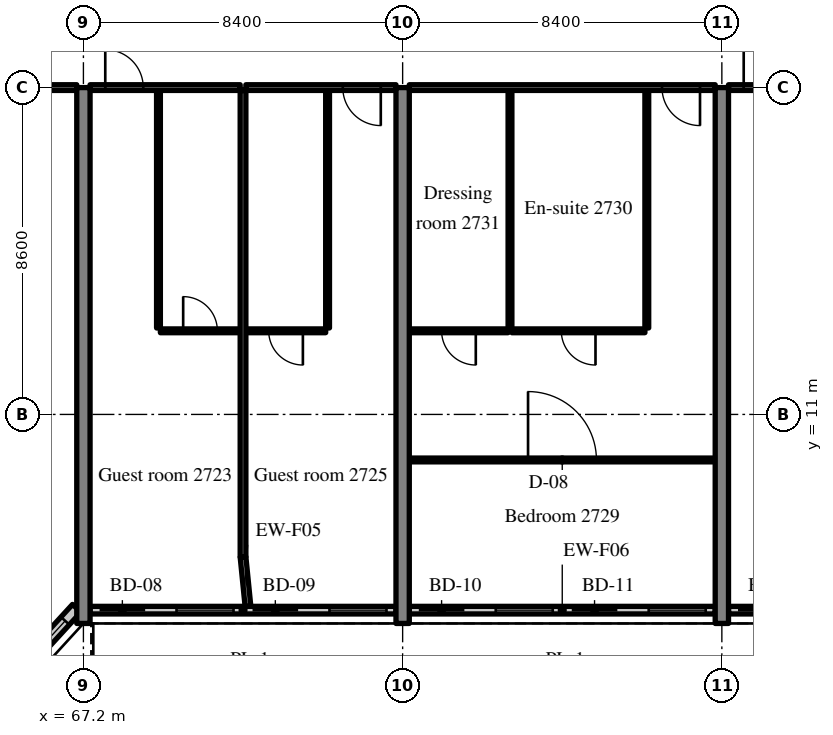
"""IFC4 building model, lengths in metres.
Left out: names, types, materials, properties, quantities, classifications, styles, units other than length and angle.
Written with IfcOpenShell. Run it as: python <this file> out.ifc"""

import sys

from ifc_helpers import new_model, si_unit, direction, frame, frame_2d, origin, place, context, subcontext, project, spatial, rectangle, extrude, source, transform, mapped, element, fill, save


model = new_model("IFC4")
c1 = context("Model", 3, precision=1e-05, world=origin(), true_north=direction((0.0, 1.0)))
c2 = subcontext(c1, "Body", "Model", "MODEL_VIEW")
j1 = project(units=[si_unit("LENGTHUNIT", "METRE"), si_unit("PLANEANGLEUNIT", "RADIAN")], contexts=[c1])
p1 = place(None, origin())
s1 = spatial("IfcSite", under=j1, at=p1, CompositionType="ELEMENT")
p2 = place(p1, origin())
s2 = spatial("IfcBuilding", under=s1, at=p2, CompositionType="ELEMENT")
p3 = place(p2, frame((0.0, 0.0, 114.2)))
s3 = spatial("IfcBuildingStorey", under=s2, at=p3, CompositionType="ELEMENT", Elevation=114.2)
m1 = source(origin(), c2, "Body", "SweptSolid", [
    extrude(rectangle(XDim=14.1, YDim=0.35, at=frame_2d((7.05, 0.0))), origin(), (0.0, 0.0, 1.0), 3.52),
])
for number, where, z_axis, x_axis in (
    (1, (67.2, 5.5, 0.0), (0.0, 0.0, 1.0), (0.0, 1.0, 0.0)),
    (2, (75.6, 5.5, 0.0), (0.0, 0.0, 1.0), (0.0, 1.0, 0.0)),
    (3, (84.0, 5.5, 0.0), (0.0, 0.0, 1.0), (0.0, 1.0, 0.0)),
):
    element("IfcWall", number, at=place(p3, frame(where, z_axis=z_axis, x_axis=x_axis)), inside=s3, PredefinedType="SHEAR", context=c2, shape_type="MappedRepresentation", body=[
        mapped(m1, transform((0.0, 0.0, 0.0), scale=1.0)),
    ])
m2 = source(origin(), c2, "Body", "SweptSolid", [
    extrude(rectangle(XDim=2.398, YDim=0.3, at=frame_2d((1.199, 0.0))), origin(), (0.0, 0.0, 1.0), 3.52),
])
p4 = place(p3, frame((65.404, 4.131, 0.0), z_axis=(0.0, 0.0, 1.0), x_axis=(0.675374189419, 0.737475222815, 0.0)))
e4 = element("IfcWall", 4, at=p4, inside=s3, PredefinedType="SOLIDWALL", context=c2, shape_type="MappedRepresentation", body=[
    mapped(m2, transform((0.0, 0.0, 0.0), scale=1.0)),
])
m3 = source(origin(), c2, "Body", "SweptSolid", [
    extrude(rectangle(XDim=1.5, YDim=2.0, at=frame_2d((0.75, 1.0))), frame((0.0, 0.16, 0.0), z_axis=(0.0, -1.0, 0.0), x_axis=(1.0, 0.0, 0.0)), (0.0, 0.0, 1.0), 0.32),
])
p5 = place(p4, frame((0.449, 0.0, 0.9)))
e5 = element("IfcOpeningElement", 5, at=p5, cuts=e4, PredefinedType="OPENING", context=c2, shape_type="MappedRepresentation", body=[
    mapped(m3, transform((0.0, 0.0, 0.0), scale=1.0)),
])
m4 = source(origin(), c2, "Body", "SweptSolid", [
    extrude(rectangle(XDim=8.05, YDim=0.2, at=frame_2d((4.025, 0.0))), origin(), (0.0, 0.0, 1.0), 2.82),
])
p6 = place(p3, frame((67.375, 5.85, 0.0), z_axis=(0.0, 0.0, 1.0), x_axis=(1.0, 0.0, 0.0)))
e6 = element("IfcWall", 6, at=p6, inside=s3, PredefinedType="SOLIDWALL", context=c2, shape_type="MappedRepresentation", body=[
    mapped(m4, transform((0.0, 0.0, 0.0), scale=1.0)),
])
m5 = source(origin(), c2, "Body", "SweptSolid", [
    extrude(rectangle(XDim=1.2, YDim=2.4, at=frame_2d((0.6, 1.2))), frame((0.0, 0.11, 0.0), z_axis=(0.0, -1.0, 0.0), x_axis=(1.0, 0.0, 0.0)), (0.0, 0.0, 1.0), 0.22),
])
p7 = place(p6, frame((0.25, 0.0, 0.0)))
e7 = element("IfcOpeningElement", 7, at=p7, cuts=e6, PredefinedType="OPENING", context=c2, shape_type="MappedRepresentation", body=[
    mapped(m5, transform((0.0, 0.0, 0.0), scale=1.0)),
])
m6 = source(origin(), c2, "Body", "SweptSolid", [
    extrude(rectangle(XDim=1.5, YDim=1.5, at=frame_2d((0.75, 0.75))), frame((0.0, 0.11, 0.0), z_axis=(0.0, -1.0, 0.0), x_axis=(1.0, 0.0, 0.0)), (0.0, 0.0, 1.0), 0.22),
])
p8 = place(p6, frame((2.275, 0.0, 0.9)))
e8 = element("IfcOpeningElement", 8, at=p8, cuts=e6, PredefinedType="OPENING", context=c2, shape_type="MappedRepresentation", body=[
    mapped(m6, transform((0.0, 0.0, 0.0), scale=1.0)),
])
p9 = place(p6, frame((4.275, 0.0, 0.0)))
e9 = element("IfcOpeningElement", 9, at=p9, cuts=e6, PredefinedType="OPENING", context=c2, shape_type="MappedRepresentation", body=[
    mapped(m5, transform((0.0, 0.0, 0.0), scale=1.0)),
])
p10 = place(p6, frame((6.3, 0.0, 0.9)))
e10 = element("IfcOpeningElement", 10, at=p10, cuts=e6, PredefinedType="OPENING", context=c2, shape_type="MappedRepresentation", body=[
    mapped(m6, transform((0.0, 0.0, 0.0), scale=1.0)),
])
p11 = place(p3, frame((75.775, 5.85, 0.0), z_axis=(0.0, 0.0, 1.0), x_axis=(1.0, 0.0, 0.0)))
e11 = element("IfcWall", 11, at=p11, inside=s3, PredefinedType="SOLIDWALL", context=c2, shape_type="MappedRepresentation", body=[
    mapped(m4, transform((0.0, 0.0, 0.0), scale=1.0)),
])
p12 = place(p11, frame((0.25, 0.0, 0.0)))
e12 = element("IfcOpeningElement", 12, at=p12, cuts=e11, PredefinedType="OPENING", context=c2, shape_type="MappedRepresentation", body=[
    mapped(m5, transform((0.0, 0.0, 0.0), scale=1.0)),
])
p13 = place(p11, frame((2.275, 0.0, 0.9)))
e13 = element("IfcOpeningElement", 13, at=p13, cuts=e11, PredefinedType="OPENING", context=c2, shape_type="MappedRepresentation", body=[
    mapped(m6, transform((0.0, 0.0, 0.0), scale=1.0)),
])
p14 = place(p11, frame((4.275, 0.0, 0.0)))
e14 = element("IfcOpeningElement", 14, at=p14, cuts=e11, PredefinedType="OPENING", context=c2, shape_type="MappedRepresentation", body=[
    mapped(m5, transform((0.0, 0.0, 0.0), scale=1.0)),
])
p15 = place(p11, frame((6.3, 0.0, 0.9)))
e15 = element("IfcOpeningElement", 15, at=p15, cuts=e11, PredefinedType="OPENING", context=c2, shape_type="MappedRepresentation", body=[
    mapped(m6, transform((0.0, 0.0, 0.0), scale=1.0)),
])
p16 = place(p3, frame((84.175, 5.85, 0.0), z_axis=(0.0, 0.0, 1.0), x_axis=(1.0, 0.0, 0.0)))
e16 = element("IfcWall", 16, at=p16, inside=s3, PredefinedType="SOLIDWALL", context=c2, shape_type="MappedRepresentation", body=[
    mapped(m4, transform((0.0, 0.0, 0.0), scale=1.0)),
])
p17 = place(p16, frame((0.25, 0.0, 0.0)))
e17 = element("IfcOpeningElement", 17, at=p17, cuts=e16, PredefinedType="OPENING", context=c2, shape_type="MappedRepresentation", body=[
    mapped(m5, transform((0.0, 0.0, 0.0), scale=1.0)),
])
p18 = place(p16, frame((2.275, 0.0, 0.9)))
e18 = element("IfcOpeningElement", 18, at=p18, cuts=e16, PredefinedType="OPENING", context=c2, shape_type="MappedRepresentation", body=[
    mapped(m6, transform((0.0, 0.0, 0.0), scale=1.0)),
])
p19 = place(p16, frame((4.275, 0.0, 0.0)))
e19 = element("IfcOpeningElement", 19, at=p19, cuts=e16, PredefinedType="OPENING", context=c2, shape_type="MappedRepresentation", body=[
    mapped(m5, transform((0.0, 0.0, 0.0), scale=1.0)),
])
p20 = place(p16, frame((6.3, 0.0, 0.9)))
e20 = element("IfcOpeningElement", 20, at=p20, cuts=e16, PredefinedType="OPENING", context=c2, shape_type="MappedRepresentation", body=[
    mapped(m6, transform((0.0, 0.0, 0.0), scale=1.0)),
])
m7 = source(origin(), c2, "Body", "SweptSolid", [
    extrude(rectangle(XDim=8.05, YDim=0.15, at=frame_2d((4.025, 0.0))), origin(), (0.0, 0.0, 1.0), 2.82),
])
p21 = place(p3, frame((58.975, 19.6, 0.0), z_axis=(0.0, 0.0, 1.0), x_axis=(1.0, 0.0, 0.0)))
e21 = element("IfcWall", 21, at=p21, inside=s3, PredefinedType="PARTITIONING", context=c2, shape_type="MappedRepresentation", body=[
    mapped(m7, transform((0.0, 0.0, 0.0), scale=1.0)),
])
m8 = source(origin(), c2, "Body", "SweptSolid", [
    extrude(rectangle(XDim=1.8, YDim=2.1, at=frame_2d((0.9, 1.05))), frame((0.0, 0.085, 0.0), z_axis=(0.0, -1.0, 0.0), x_axis=(1.0, 0.0, 0.0)), (0.0, 0.0, 1.0), 0.17),
])
p22 = place(p21, frame((3.125, 0.0, 0.0)))
e22 = element("IfcOpeningElement", 22, at=p22, cuts=e21, PredefinedType="OPENING", context=c2, shape_type="MappedRepresentation", body=[
    mapped(m8, transform((0.0, 0.0, 0.0), scale=1.0)),
])
m9 = source(origin(), c2, "Body", "SweptSolid", [
    extrude(rectangle(XDim=6.25, YDim=0.1, at=frame_2d((3.125, 0.0))), origin(), (0.0, 0.0, 1.0), 3.52),
])
p23 = place(p3, frame((69.175, 13.275, 0.0), z_axis=(0.0, 0.0, 1.0), x_axis=(0.0, 1.0, 0.0)))
e23 = element("IfcWall", 23, at=p23, inside=s3, PredefinedType="PARTITIONING", context=c2, shape_type="MappedRepresentation", body=[
    mapped(m9, transform((0.0, 0.0, 0.0), scale=1.0)),
])
m10 = source(origin(), c2, "Body", "SweptSolid", [
    extrude(rectangle(XDim=2.1, YDim=0.1, at=frame_2d((1.05, 0.0))), origin(), (0.0, 0.0, 1.0), 3.52),
])
p24 = place(p3, frame((69.225, 13.2, 0.0), z_axis=(0.0, 0.0, 1.0), x_axis=(1.0, 0.0, 0.0)))
e24 = element("IfcWall", 24, at=p24, inside=s3, PredefinedType="PARTITIONING", context=c2, shape_type="MappedRepresentation", body=[
    mapped(m10, transform((0.0, 0.0, 0.0), scale=1.0)),
])
m11 = source(origin(), c2, "Body", "SweptSolid", [
    extrude(rectangle(XDim=0.9, YDim=2.1, at=frame_2d((0.45, 1.05))), frame((0.0, 0.06, 0.0), z_axis=(0.0, -1.0, 0.0), x_axis=(1.0, 0.0, 0.0)), (0.0, 0.0, 1.0), 0.12),
])
p25 = place(p24, frame((0.6, 0.0, 0.0)))
e25 = element("IfcOpeningElement", 25, at=p25, cuts=e24, PredefinedType="OPENING", context=c2, shape_type="MappedRepresentation", body=[
    mapped(m11, transform((0.0, 0.0, 0.0), scale=1.0)),
])
m12 = source(origin(), c2, "Body", "SweptSolid", [
    extrude(rectangle(XDim=3.95, YDim=0.15, at=frame_2d((1.975, 0.0))), origin(), (0.0, 0.0, 1.0), 2.82),
])
p26 = place(p3, frame((67.375, 19.6, 0.0), z_axis=(0.0, 0.0, 1.0), x_axis=(1.0, 0.0, 0.0)))
e26 = element("IfcWall", 26, at=p26, inside=s3, PredefinedType="PARTITIONING", context=c2, shape_type="MappedRepresentation", body=[
    mapped(m12, transform((0.0, 0.0, 0.0), scale=1.0)),
])
m13 = source(origin(), c2, "Body", "SweptSolid", [
    extrude(rectangle(XDim=1.0, YDim=2.1, at=frame_2d((0.5, 1.05))), frame((0.0, 0.085, 0.0), z_axis=(0.0, -1.0, 0.0), x_axis=(1.0, 0.0, 0.0)), (0.0, 0.0, 1.0), 0.17),
])
p27 = place(p26, frame((0.4, 0.0, 0.0)))
e27 = element("IfcOpeningElement", 27, at=p27, cuts=e26, PredefinedType="OPENING", context=c2, shape_type="MappedRepresentation", body=[
    mapped(m13, transform((0.0, 0.0, 0.0), scale=1.0)),
])
p28 = place(p3, frame((73.625, 13.275, 0.0), z_axis=(0.0, 0.0, 1.0), x_axis=(0.0, 1.0, 0.0)))
e28 = element("IfcWall", 28, at=p28, inside=s3, PredefinedType="PARTITIONING", context=c2, shape_type="MappedRepresentation", body=[
    mapped(m9, transform((0.0, 0.0, 0.0), scale=1.0)),
])
p29 = place(p3, frame((71.475, 13.2, 0.0), z_axis=(0.0, 0.0, 1.0), x_axis=(1.0, 0.0, 0.0)))
e29 = element("IfcWall", 29, at=p29, inside=s3, PredefinedType="PARTITIONING", context=c2, shape_type="MappedRepresentation", body=[
    mapped(m10, transform((0.0, 0.0, 0.0), scale=1.0)),
])
p30 = place(p29, frame((0.6, 0.0, 0.0)))
e30 = element("IfcOpeningElement", 30, at=p30, cuts=e29, PredefinedType="OPENING", context=c2, shape_type="MappedRepresentation", body=[
    mapped(m11, transform((0.0, 0.0, 0.0), scale=1.0)),
])
p31 = place(p3, frame((71.475, 19.6, 0.0), z_axis=(0.0, 0.0, 1.0), x_axis=(1.0, 0.0, 0.0)))
e31 = element("IfcWall", 31, at=p31, inside=s3, PredefinedType="PARTITIONING", context=c2, shape_type="MappedRepresentation", body=[
    mapped(m12, transform((0.0, 0.0, 0.0), scale=1.0)),
])
p32 = place(p31, frame((2.55, 0.0, 0.0)))
e32 = element("IfcOpeningElement", 32, at=p32, cuts=e31, PredefinedType="OPENING", context=c2, shape_type="MappedRepresentation", body=[
    mapped(m13, transform((0.0, 0.0, 0.0), scale=1.0)),
])
m14 = source(origin(), c2, "Body", "SweptSolid", [
    extrude(rectangle(XDim=12.275, YDim=0.15, at=frame_2d((6.137, 0.0))), origin(), (0.0, 0.0, 1.0), 3.52),
])
p33 = place(p3, frame((71.4, 7.25, 0.0), z_axis=(0.0, 0.0, 1.0), x_axis=(0.0, 1.0, 0.0)))
e33 = element("IfcWall", 33, at=p33, inside=s3, PredefinedType="PARTITIONING", context=c2, shape_type="MappedRepresentation", body=[
    mapped(m14, transform((0.0, 0.0, 0.0), scale=1.0)),
])
for number, where, z_axis, x_axis in (
    (34, (82.025, 13.275, 0.0), (0.0, 0.0, 1.0), (0.0, 1.0, 0.0)),
    (35, (78.425, 13.275, 0.0), (0.0, 0.0, 1.0), (0.0, 1.0, 0.0)),
):
    element("IfcWall", number, at=place(p3, frame(where, z_axis=z_axis, x_axis=x_axis)), inside=s3, PredefinedType="PARTITIONING", context=c2, shape_type="MappedRepresentation", body=[
        mapped(m9, transform((0.0, 0.0, 0.0), scale=1.0)),
    ])
m15 = source(origin(), c2, "Body", "SweptSolid", [
    extrude(rectangle(XDim=3.5, YDim=0.1, at=frame_2d((1.75, 0.0))), origin(), (0.0, 0.0, 1.0), 3.52),
])
p34 = place(p3, frame((78.475, 13.2, 0.0), z_axis=(0.0, 0.0, 1.0), x_axis=(1.0, 0.0, 0.0)))
e36 = element("IfcWall", 36, at=p34, inside=s3, PredefinedType="PARTITIONING", context=c2, shape_type="MappedRepresentation", body=[
    mapped(m15, transform((0.0, 0.0, 0.0), scale=1.0)),
])
p35 = place(p34, frame((1.3, 0.0, 0.0)))
e37 = element("IfcOpeningElement", 37, at=p35, cuts=e36, PredefinedType="OPENING", context=c2, shape_type="MappedRepresentation", body=[
    mapped(m11, transform((0.0, 0.0, 0.0), scale=1.0)),
])
m16 = source(origin(), c2, "Body", "SweptSolid", [
    extrude(rectangle(XDim=2.6, YDim=0.1, at=frame_2d((1.3, 0.0))), origin(), (0.0, 0.0, 1.0), 3.52),
])
p36 = place(p3, frame((75.775, 13.2, 0.0), z_axis=(0.0, 0.0, 1.0), x_axis=(1.0, 0.0, 0.0)))
e38 = element("IfcWall", 38, at=p36, inside=s3, PredefinedType="PARTITIONING", context=c2, shape_type="MappedRepresentation", body=[
    mapped(m16, transform((0.0, 0.0, 0.0), scale=1.0)),
])
p37 = place(p36, frame((0.85, 0.0, 0.0)))
e39 = element("IfcOpeningElement", 39, at=p37, cuts=e38, PredefinedType="OPENING", context=c2, shape_type="MappedRepresentation", body=[
    mapped(m11, transform((0.0, 0.0, 0.0), scale=1.0)),
])
m17 = source(origin(), c2, "Body", "SweptSolid", [
    extrude(rectangle(XDim=8.05, YDim=0.1, at=frame_2d((4.025, 0.0))), origin(), (0.0, 0.0, 1.0), 3.52),
])
p38 = place(p3, frame((75.775, 9.802, 0.0), z_axis=(0.0, 0.0, 1.0), x_axis=(1.0, 0.0, 0.0)))
e40 = element("IfcWall", 40, at=p38, inside=s3, PredefinedType="PARTITIONING", context=c2, shape_type="MappedRepresentation", body=[
    mapped(m17, transform((0.0, 0.0, 0.0), scale=1.0)),
])
m18 = source(origin(), c2, "Body", "SweptSolid", [
    extrude(rectangle(XDim=1.8, YDim=2.1, at=frame_2d((0.9, 1.05))), frame((0.0, 0.06, 0.0), z_axis=(0.0, -1.0, 0.0), x_axis=(1.0, 0.0, 0.0)), (0.0, 0.0, 1.0), 0.12),
])
p39 = place(p38, frame((3.125, 0.0, 0.0)))
e41 = element("IfcOpeningElement", 41, at=p39, cuts=e40, PredefinedType="OPENING", context=c2, shape_type="MappedRepresentation", body=[
    mapped(m18, transform((0.0, 0.0, 0.0), scale=1.0)),
])
m19 = source(origin(), c2, "Body", "SweptSolid", [
    extrude(rectangle(XDim=8.05, YDim=0.15, at=frame_2d((4.025, 0.0))), origin(), (0.0, 0.0, 1.0), 2.82),
])
p40 = place(p3, frame((75.775, 19.6, 0.0), z_axis=(0.0, 0.0, 1.0), x_axis=(1.0, 0.0, 0.0)))
e42 = element("IfcWall", 42, at=p40, inside=s3, PredefinedType="PARTITIONING", context=c2, shape_type="MappedRepresentation", body=[
    mapped(m19, transform((0.0, 0.0, 0.0), scale=1.0)),
])
p41 = place(p40, frame((6.65, 0.0, 0.0)))
e43 = element("IfcOpeningElement", 43, at=p41, cuts=e42, PredefinedType="OPENING", context=c2, shape_type="MappedRepresentation", body=[
    mapped(m13, transform((0.0, 0.0, 0.0), scale=1.0)),
])
p42 = place(p3, frame((84.175, 19.6, 0.0), z_axis=(0.0, 0.0, 1.0), x_axis=(1.0, 0.0, 0.0)))
e44 = element("IfcWall", 44, at=p42, inside=s3, PredefinedType="PARTITIONING", context=c2, shape_type="MappedRepresentation", body=[
    mapped(m19, transform((0.0, 0.0, 0.0), scale=1.0)),
])
p43 = place(p42, frame((0.4, 0.0, 0.0)))
e45 = element("IfcOpeningElement", 45, at=p43, cuts=e44, PredefinedType="OPENING", context=c2, shape_type="MappedRepresentation", body=[
    mapped(m13, transform((0.0, 0.0, 0.0), scale=1.0)),
])
m20 = source(origin(), c2, "Body", "SweptSolid", [
    extrude(rectangle(XDim=1.307, YDim=0.15, at=frame_2d((0.653, 0.0))), origin(), (0.0, 0.0, 1.0), 3.52),
])
p44 = place(p3, frame((71.53, 5.95, 0.0), z_axis=(0.0, 0.0, 1.0), x_axis=(-0.099596223396, 0.99502793543, 0.0)))
e46 = element("IfcWall", 46, at=p44, inside=s3, PredefinedType="PARTITIONING", context=c2, shape_type="MappedRepresentation", body=[
    mapped(m20, transform((0.0, 0.0, 0.0), scale=1.0)),
])
m21 = source(origin(), c2, "Body", "SweptSolid", [
    extrude(rectangle(XDim=1.5, YDim=2.0, at=frame_2d((0.75, 1.0))), frame((0.0, 0.03, 0.0), z_axis=(0.0, -1.0, 0.0), x_axis=(1.0, 0.0, 0.0)), (0.0, 0.0, 1.0), 0.06),
])
p45 = place(p5, origin())
e47 = element("IfcWindow", 47, at=p45, inside=s3, PartitioningType="SINGLE_PANEL", PredefinedType="WINDOW", context=c2, shape_type="MappedRepresentation", body=[
    mapped(m21, transform((0.0, 0.0, 0.0), scale=1.0)),
])
fill(e5, e47)
m22 = source(origin(), c2, "Body", "SweptSolid", [
    extrude(rectangle(XDim=1.2, YDim=2.4, at=frame_2d((0.6, 1.2))), frame((0.0, 0.025, 0.0), z_axis=(0.0, -1.0, 0.0), x_axis=(1.0, 0.0, 0.0)), (0.0, 0.0, 1.0), 0.05),
])
p46 = place(p7, origin())
e48 = element("IfcDoor", 48, at=p46, inside=s3, OperationType="SLIDING_TO_RIGHT", PredefinedType="DOOR", context=c2, shape_type="MappedRepresentation", body=[
    mapped(m22, transform((0.0, 0.0, 0.0), scale=1.0)),
])
fill(e7, e48)
m23 = source(origin(), c2, "Body", "SweptSolid", [
    extrude(rectangle(XDim=1.5, YDim=1.5, at=frame_2d((0.75, 0.75))), frame((0.0, 0.03, 0.0), z_axis=(0.0, -1.0, 0.0), x_axis=(1.0, 0.0, 0.0)), (0.0, 0.0, 1.0), 0.06),
])
p47 = place(p8, origin())
e49 = element("IfcWindow", 49, at=p47, inside=s3, PartitioningType="SINGLE_PANEL", PredefinedType="WINDOW", context=c2, shape_type="MappedRepresentation", body=[
    mapped(m23, transform((0.0, 0.0, 0.0), scale=1.0)),
])
fill(e8, e49)
p48 = place(p9, origin())
e50 = element("IfcDoor", 50, at=p48, inside=s3, OperationType="SLIDING_TO_LEFT", PredefinedType="DOOR", context=c2, shape_type="MappedRepresentation", body=[
    mapped(m22, transform((0.0, 0.0, 0.0), scale=1.0)),
])
fill(e9, e50)
p49 = place(p10, origin())
e51 = element("IfcWindow", 51, at=p49, inside=s3, PartitioningType="SINGLE_PANEL", PredefinedType="WINDOW", context=c2, shape_type="MappedRepresentation", body=[
    mapped(m23, transform((0.0, 0.0, 0.0), scale=1.0)),
])
fill(e10, e51)
p50 = place(p12, origin())
e52 = element("IfcDoor", 52, at=p50, inside=s3, OperationType="SLIDING_TO_RIGHT", PredefinedType="DOOR", context=c2, shape_type="MappedRepresentation", body=[
    mapped(m22, transform((0.0, 0.0, 0.0), scale=1.0)),
])
fill(e12, e52)
p51 = place(p13, origin())
e53 = element("IfcWindow", 53, at=p51, inside=s3, PartitioningType="SINGLE_PANEL", PredefinedType="WINDOW", context=c2, shape_type="MappedRepresentation", body=[
    mapped(m23, transform((0.0, 0.0, 0.0), scale=1.0)),
])
fill(e13, e53)
p52 = place(p14, origin())
e54 = element("IfcDoor", 54, at=p52, inside=s3, OperationType="SLIDING_TO_LEFT", PredefinedType="DOOR", context=c2, shape_type="MappedRepresentation", body=[
    mapped(m22, transform((0.0, 0.0, 0.0), scale=1.0)),
])
fill(e14, e54)
p53 = place(p15, origin())
e55 = element("IfcWindow", 55, at=p53, inside=s3, PartitioningType="SINGLE_PANEL", PredefinedType="WINDOW", context=c2, shape_type="MappedRepresentation", body=[
    mapped(m23, transform((0.0, 0.0, 0.0), scale=1.0)),
])
fill(e15, e55)
p54 = place(p17, origin())
e56 = element("IfcDoor", 56, at=p54, inside=s3, OperationType="SLIDING_TO_RIGHT", PredefinedType="DOOR", context=c2, shape_type="MappedRepresentation", body=[
    mapped(m22, transform((0.0, 0.0, 0.0), scale=1.0)),
])
fill(e17, e56)
m24 = source(origin(), c2, "Body", "SweptSolid", [
    extrude(rectangle(XDim=0.9, YDim=2.1, at=frame_2d((0.45, 1.05))), frame((0.0, 0.025, 0.0), z_axis=(0.0, -1.0, 0.0), x_axis=(1.0, 0.0, 0.0)), (0.0, 0.0, 1.0), 0.05),
])
p55 = place(p25, origin())
e57 = element("IfcDoor", 57, at=p55, inside=s3, OperationType="SINGLE_SWING_LEFT", PredefinedType="DOOR", context=c2, shape_type="MappedRepresentation", body=[
    mapped(m24, transform((0.0, 0.0, 0.0), scale=1.0)),
])
fill(e25, e57)
m25 = source(origin(), c2, "Body", "SweptSolid", [
    extrude(rectangle(XDim=1.0, YDim=2.1, at=frame_2d((0.5, 1.05))), frame((0.0, 0.025, 0.0), z_axis=(0.0, -1.0, 0.0), x_axis=(1.0, 0.0, 0.0)), (0.0, 0.0, 1.0), 0.05),
])
p56 = place(p27, origin())
e58 = element("IfcDoor", 58, at=p56, inside=s3, OperationType="SINGLE_SWING_LEFT", PredefinedType="DOOR", context=c2, shape_type="MappedRepresentation", body=[
    mapped(m25, transform((0.0, 0.0, 0.0), scale=1.0)),
])
fill(e27, e58)
p57 = place(p30, origin())
e59 = element("IfcDoor", 59, at=p57, inside=s3, OperationType="SINGLE_SWING_RIGHT", PredefinedType="DOOR", context=c2, shape_type="MappedRepresentation", body=[
    mapped(m24, transform((0.0, 0.0, 0.0), scale=1.0)),
])
fill(e30, e59)
p58 = place(p32, origin())
e60 = element("IfcDoor", 60, at=p58, inside=s3, OperationType="SINGLE_SWING_RIGHT", PredefinedType="DOOR", context=c2, shape_type="MappedRepresentation", body=[
    mapped(m25, transform((0.0, 0.0, 0.0), scale=1.0)),
])
fill(e32, e60)
p59 = place(p35, origin())
e61 = element("IfcDoor", 61, at=p59, inside=s3, OperationType="SINGLE_SWING_RIGHT", PredefinedType="DOOR", context=c2, shape_type="MappedRepresentation", body=[
    mapped(m24, transform((0.0, 0.0, 0.0), scale=1.0)),
])
fill(e37, e61)
p60 = place(p37, origin())
e62 = element("IfcDoor", 62, at=p60, inside=s3, OperationType="SINGLE_SWING_RIGHT", PredefinedType="DOOR", context=c2, shape_type="MappedRepresentation", body=[
    mapped(m24, transform((0.0, 0.0, 0.0), scale=1.0)),
])
fill(e39, e62)
m26 = source(origin(), c2, "Body", "SweptSolid", [
    extrude(rectangle(XDim=1.8, YDim=2.1, at=frame_2d((0.9, 1.05))), frame((0.0, 0.025, 0.0), z_axis=(0.0, -1.0, 0.0), x_axis=(1.0, 0.0, 0.0)), (0.0, 0.0, 1.0), 0.05),
])
p61 = place(p39, origin())
e63 = element("IfcDoor", 63, at=p61, inside=s3, OperationType="DOUBLE_DOOR_SINGLE_SWING", PredefinedType="DOOR", context=c2, shape_type="MappedRepresentation", body=[
    mapped(m26, transform((0.0, 0.0, 0.0), scale=1.0)),
])
fill(e41, e63)
p62 = place(p41, origin())
e64 = element("IfcDoor", 64, at=p62, inside=s3, OperationType="SINGLE_SWING_RIGHT", PredefinedType="DOOR", context=c2, shape_type="MappedRepresentation", body=[
    mapped(m25, transform((0.0, 0.0, 0.0), scale=1.0)),
])
fill(e43, e64)
p63 = place(p43, origin())
e65 = element("IfcDoor", 65, at=p63, inside=s3, OperationType="SINGLE_SWING_LEFT", PredefinedType="DOOR", context=c2, shape_type="MappedRepresentation", body=[
    mapped(m25, transform((0.0, 0.0, 0.0), scale=1.0)),
])
fill(e45, e65)
save(model, sys.argv[1])
